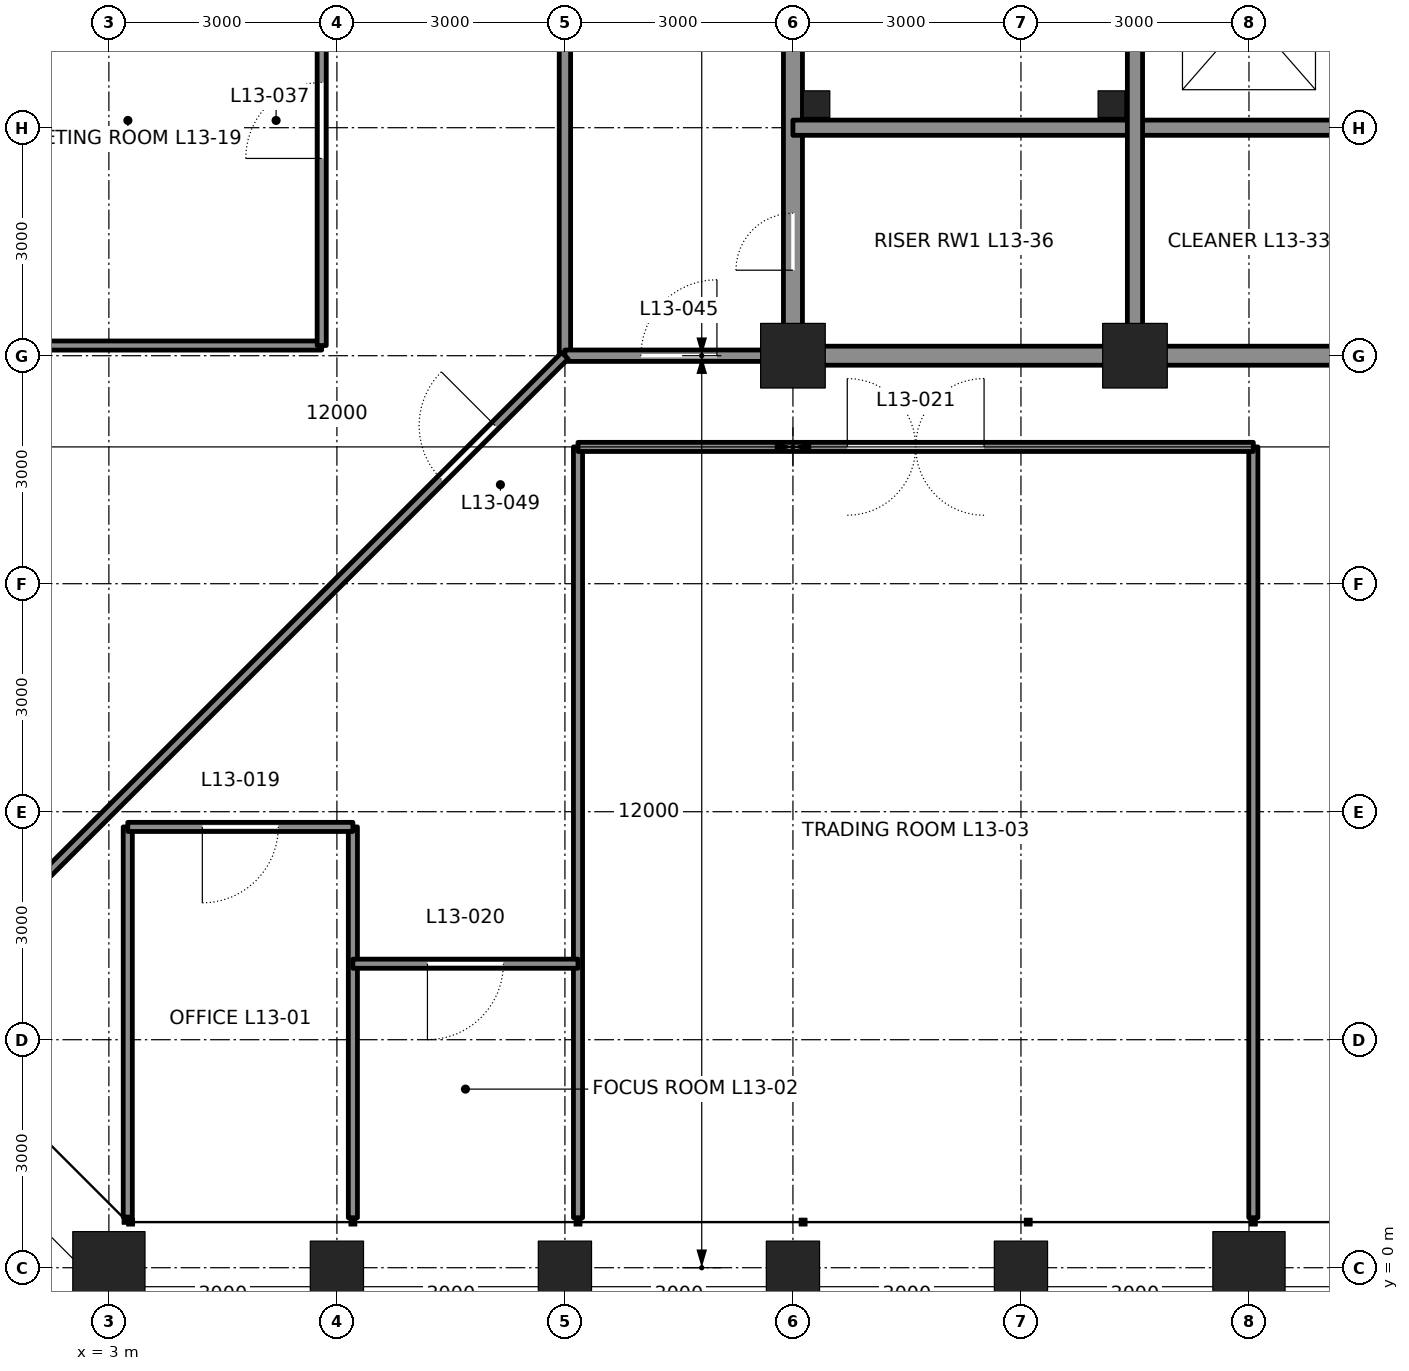
"""IFC4 building model, lengths in metres.
Left out: names, types, materials, properties, quantities, classifications, styles, units other than length and angle.
Written with IfcOpenShell. Run it as: python <this file> out.ifc"""

import sys

from ifc_helpers import new_model, si_unit, direction, frame, frame_2d, origin, origin_2d, place, context, subcontext, project, spatial, rectangle, hollow_rectangle, extrude, element, fill, save


model = new_model("IFC4")
c1 = context("Model", 3, precision=1e-05, world=origin(), true_north=direction((0.0, 1.0)))
c2 = subcontext(c1, "Body", "Model", "MODEL_VIEW")
j1 = project(units=[si_unit("LENGTHUNIT", "METRE"), si_unit("PLANEANGLEUNIT", "RADIAN")], contexts=[c1])
p1 = place(None, origin())
s1 = spatial("IfcSite", under=j1, at=p1, CompositionType="ELEMENT")
p2 = place(p1, origin())
s2 = spatial("IfcBuilding", under=s1, at=p2, CompositionType="ELEMENT")
p3 = place(p2, frame((0.0, 0.0, 64.8)))
s3 = spatial("IfcBuildingStorey", under=s2, at=p3, CompositionType="ELEMENT", Elevation=64.8)
p4 = place(p3, frame((3.0, 0.0, 0.0), z_axis=(0.0, 0.0, 1.0), x_axis=(0.0, -1.0, 0.0)))
e1 = element("IfcColumn", 1, at=p4, inside=s3, PredefinedType="COLUMN", context=c2, shape_type="SweptSolid", body=[
    extrude(hollow_rectangle(XDim=0.95, YDim=0.95, WallThickness=0.095, at=origin_2d()), origin(), (0.0, 0.0, 1.0), 4.5),
])
for number, where, z_axis, x_axis in (
    (2, (6.0, 0.0, 0.0), (0.0, 0.0, 1.0), (0.0, -1.0, 0.0)),
    (3, (9.0, 0.0, 0.0), (0.0, 0.0, 1.0), (0.0, -1.0, 0.0)),
    (4, (12.0, 0.0, 0.0), (0.0, 0.0, 1.0), (0.0, -1.0, 0.0)),
    (5, (15.0, 0.0, 0.0), (0.0, 0.0, 1.0), (0.0, -1.0, 0.0)),
):
    element("IfcColumn", number, at=place(p3, frame(where, z_axis=z_axis, x_axis=x_axis)), inside=s3, PredefinedType="COLUMN", context=c2, shape_type="SweptSolid", body=[
        extrude(hollow_rectangle(XDim=0.7, YDim=0.7, WallThickness=0.07, at=origin_2d()), origin(), (0.0, 0.0, 1.0), 4.5),
    ])
p5 = place(p3, frame((18.0, 0.0, 0.0), z_axis=(0.0, 0.0, 1.0), x_axis=(0.0, -1.0, 0.0)))
e6 = element("IfcColumn", 6, at=p5, inside=s3, PredefinedType="COLUMN", context=c2, shape_type="SweptSolid", body=[
    extrude(hollow_rectangle(XDim=0.95, YDim=0.95, WallThickness=0.11, at=origin_2d()), origin(), (0.0, 0.0, 1.0), 4.5),
])
for number, where, z_axis, x_axis in (
    (7, (12.0, 12.0, 0.0), (0.0, 0.0, 1.0), (1.0, 0.0, 0.0)),
    (8, (16.5, 12.0, 0.0), (0.0, 0.0, 1.0), (1.0, 0.0, 0.0)),
):
    element("IfcColumn", number, at=place(p3, frame(where, z_axis=z_axis, x_axis=x_axis)), inside=s3, PredefinedType="COLUMN", context=c2, shape_type="SweptSolid", body=[
        extrude(hollow_rectangle(XDim=0.85, YDim=0.85, WallThickness=0.085, at=origin_2d()), origin(), (0.0, 0.0, 1.0), 4.5),
    ])
p6 = place(p3, frame((12.0, 12.25, 0.0), z_axis=(0.0, 0.0, 1.0), x_axis=(0.0, 1.0, 0.0)))
e9 = element("IfcWall", 9, at=p6, inside=s3, PredefinedType="SOLIDWALL", context=c2, shape_type="SweptSolid", body=[
    extrude(rectangle(XDim=8.5, YDim=0.25, at=frame_2d((4.25, 0.0))), origin(), (0.0, 0.0, 1.0), 3.113),
])
p7 = place(p6, frame((0.875, 0.0, 0.0)))
e10 = element("IfcOpeningElement", 10, at=p7, cuts=e9, PredefinedType="OPENING", context=c2, shape_type="SweptSolid", body=[
    extrude(rectangle(XDim=0.75, YDim=2.1, at=frame_2d((0.375, 1.05))), frame((0.0, 0.135, 0.0), z_axis=(0.0, -1.0, 0.0), x_axis=(1.0, 0.0, 0.0)), (0.0, 0.0, 1.0), 0.27),
])
p8 = place(p3, frame((12.25, 12.0, 0.0), z_axis=(0.0, 0.0, 1.0), x_axis=(1.0, 0.0, 0.0)))
e11 = element("IfcWall", 11, at=p8, inside=s3, PredefinedType="SOLIDWALL", context=c2, shape_type="SweptSolid", body=[
    extrude(rectangle(XDim=4.0, YDim=0.25, at=frame_2d((2.0, 0.0))), origin(), (0.0, 0.0, 1.0), 3.181),
])
p9 = place(p3, frame((16.75, 12.0, 0.0), z_axis=(0.0, 0.0, 1.0), x_axis=(1.0, 0.0, 0.0)))
e12 = element("IfcWall", 12, at=p9, inside=s3, PredefinedType="SOLIDWALL", context=c2, shape_type="SweptSolid", body=[
    extrude(rectangle(XDim=2.5, YDim=0.25, at=frame_2d((1.25, 0.0))), origin(), (0.0, 0.0, 1.0), 3.181),
])
p10 = place(p3, frame((12.0, 15.0, 0.0), z_axis=(0.0, 0.0, 1.0), x_axis=(1.0, 0.0, 0.0)))
e13 = element("IfcWall", 13, at=p10, inside=s3, PredefinedType="SOLIDWALL", context=c2, shape_type="SweptSolid", body=[
    extrude(rectangle(XDim=7.5, YDim=0.2, at=frame_2d((3.75, 0.0))), origin(), (0.0, 0.0, 1.0), 4.34),
])
p11 = place(p3, frame((16.5, 12.25, 0.0), z_axis=(0.0, 0.0, 1.0), x_axis=(0.0, 1.0, 0.0)))
e14 = element("IfcWall", 14, at=p11, inside=s3, PredefinedType="SOLIDWALL", context=c2, shape_type="SweptSolid", body=[
    extrude(rectangle(XDim=8.5, YDim=0.2, at=frame_2d((4.25, 0.0))), origin(), (0.0, 0.0, 1.0), 3.413),
])
p12 = place(p3, frame((3.249, 0.666, -0.3), z_axis=(0.0, 0.0, 1.0), x_axis=(0.0, 1.0, 0.0)))
e15 = element("IfcWall", 15, at=p12, inside=s3, PredefinedType="PARTITIONING", context=c2, shape_type="SweptSolid", body=[
    extrude(rectangle(XDim=5.134, YDim=0.12, at=frame_2d((2.567, 0.0))), origin(), (0.0, 0.0, 1.0), 4.34),
])
p13 = place(p3, frame((6.21, 0.657, -0.3), z_axis=(0.0, 0.0, 1.0), x_axis=(0.0, 1.0, 0.0)))
e16 = element("IfcWall", 16, at=p13, inside=s3, PredefinedType="PARTITIONING", context=c2, shape_type="SweptSolid", body=[
    extrude(rectangle(XDim=5.143, YDim=0.12, at=frame_2d((2.571, 0.0))), origin(), (0.0, 0.0, 1.0), 4.34),
])
p14 = place(p3, frame((9.172, 0.657, -0.3), z_axis=(0.0, 0.0, 1.0), x_axis=(0.0, 1.0, 0.0)))
e17 = element("IfcWall", 17, at=p14, inside=s3, PredefinedType="PARTITIONING", context=c2, shape_type="SweptSolid", body=[
    extrude(rectangle(XDim=10.143, YDim=0.12, at=frame_2d((5.071, 0.0))), origin(), (0.0, 0.0, 1.0), 4.34),
])
p15 = place(p3, frame((18.057, 0.657, -0.3), z_axis=(0.0, 0.0, 1.0), x_axis=(0.0, 1.0, 0.0)))
e18 = element("IfcWall", 18, at=p15, inside=s3, PredefinedType="PARTITIONING", context=c2, shape_type="SweptSolid", body=[
    extrude(rectangle(XDim=10.143, YDim=0.12, at=frame_2d((5.071, 0.0))), origin(), (0.0, 0.0, 1.0), 3.646),
])
p16 = place(p3, frame((3.249, 5.8, -0.3), z_axis=(0.0, 0.0, 1.0), x_axis=(1.0, 0.0, 0.0)))
e19 = element("IfcWall", 19, at=p16, inside=s3, PredefinedType="PARTITIONING", context=c2, shape_type="SweptSolid", body=[
    extrude(rectangle(XDim=2.962, YDim=0.12, at=frame_2d((1.481, 0.0))), origin(), (0.0, 0.0, 1.0), 4.34),
])
p17 = place(p16, frame((0.981, 0.0, 0.3)))
e20 = element("IfcOpeningElement", 20, at=p17, cuts=e19, PredefinedType="OPENING", context=c2, shape_type="SweptSolid", body=[
    extrude(rectangle(XDim=1.0, YDim=2.4, at=frame_2d((0.5, 1.2))), frame((0.0, 0.07, 0.0), z_axis=(0.0, -1.0, 0.0), x_axis=(1.0, 0.0, 0.0)), (0.0, 0.0, 1.0), 0.14),
])
p18 = place(p3, frame((6.21, 4.0, -0.3), z_axis=(0.0, 0.0, 1.0), x_axis=(1.0, 0.0, 0.0)))
e21 = element("IfcWall", 21, at=p18, inside=s3, PredefinedType="PARTITIONING", context=c2, shape_type="SweptSolid", body=[
    extrude(rectangle(XDim=2.962, YDim=0.12, at=frame_2d((1.481, 0.0))), origin(), (0.0, 0.0, 1.0), 4.34),
])
p19 = place(p18, frame((0.981, 0.0, 0.3)))
e22 = element("IfcOpeningElement", 22, at=p19, cuts=e21, PredefinedType="OPENING", context=c2, shape_type="SweptSolid", body=[
    extrude(rectangle(XDim=1.0, YDim=2.4, at=frame_2d((0.5, 1.2))), frame((0.0, 0.07, 0.0), z_axis=(0.0, -1.0, 0.0), x_axis=(1.0, 0.0, 0.0)), (0.0, 0.0, 1.0), 0.14),
])
p20 = place(p3, frame((9.172, 10.8, -0.3), z_axis=(0.0, 0.0, 1.0), x_axis=(1.0, 0.0, 0.0)))
e23 = element("IfcWall", 23, at=p20, inside=s3, PredefinedType="PARTITIONING", context=c2, shape_type="SweptSolid", body=[
    extrude(rectangle(XDim=8.885, YDim=0.12, at=frame_2d((4.443, 0.0))), origin(), (0.0, 0.0, 1.0), 4.34),
])
p21 = place(p20, frame((3.543, 0.0, 0.3)))
e24 = element("IfcOpeningElement", 24, at=p21, cuts=e23, PredefinedType="OPENING", context=c2, shape_type="SweptSolid", body=[
    extrude(rectangle(XDim=1.8, YDim=2.4, at=frame_2d((0.9, 1.2))), frame((0.0, 0.07, 0.0), z_axis=(0.0, -1.0, 0.0), x_axis=(1.0, 0.0, 0.0)), (0.0, 0.0, 1.0), 0.14),
])
p22 = place(p3, frame((0.657, 12.134, -0.3), z_axis=(0.0, 0.0, 1.0), x_axis=(1.0, 0.0, 0.0)))
e25 = element("IfcWall", 25, at=p22, inside=s3, PredefinedType="PARTITIONING", context=c2, shape_type="SweptSolid", body=[
    extrude(rectangle(XDim=5.143, YDim=0.12, at=frame_2d((2.571, 0.0))), origin(), (0.0, 0.0, 1.0), 3.481),
])
p23 = place(p3, frame((5.8, 12.134, -0.3), z_axis=(0.0, 0.0, 1.0), x_axis=(0.0, 1.0, 0.0)))
e26 = element("IfcWall", 26, at=p23, inside=s3, PredefinedType="PARTITIONING", context=c2, shape_type="SweptSolid", body=[
    extrude(rectangle(XDim=5.924, YDim=0.12, at=frame_2d((2.962, 0.0))), origin(), (0.0, 0.0, 1.0), 4.34),
])
p24 = place(p23, frame((2.462, 0.0, 0.3)))
e27 = element("IfcOpeningElement", 27, at=p24, cuts=e26, PredefinedType="OPENING", context=c2, shape_type="SweptSolid", body=[
    extrude(rectangle(XDim=1.0, YDim=2.4, at=frame_2d((0.5, 1.2))), frame((0.0, 0.07, 0.0), z_axis=(0.0, -1.0, 0.0), x_axis=(1.0, 0.0, 0.0)), (0.0, 0.0, 1.0), 0.14),
])
p25 = place(p3, frame((9.0, 12.0, -0.3), z_axis=(0.0, 0.0, 1.0), x_axis=(0.0, 1.0, 0.0)))
e28 = element("IfcWall", 28, at=p25, inside=s3, PredefinedType="PARTITIONING", context=c2, shape_type="SweptSolid", body=[
    extrude(rectangle(XDim=21.0, YDim=0.15, at=frame_2d((10.5, 0.0))), origin(), (0.0, 0.0, 1.0), 4.34),
])
p26 = place(p25, frame((10.0, 0.0, 0.3)))
e29 = element("IfcOpeningElement", 29, at=p26, cuts=e28, PredefinedType="OPENING", context=c2, shape_type="SweptSolid", body=[
    extrude(rectangle(XDim=1.0, YDim=2.4, at=frame_2d((0.5, 1.2))), frame((0.0, 0.085, 0.0), z_axis=(0.0, -1.0, 0.0), x_axis=(1.0, 0.0, 0.0)), (0.0, 0.0, 1.0), 0.17),
])
p27 = place(p3, frame((9.0, 12.0, -0.3), z_axis=(0.0, 0.0, 1.0), x_axis=(1.0, 0.0, 0.0)))
e30 = element("IfcWall", 30, at=p27, inside=s3, PredefinedType="PARTITIONING", context=c2, shape_type="SweptSolid", body=[
    extrude(rectangle(XDim=3.0, YDim=0.15, at=frame_2d((1.5, 0.0))), origin(), (0.0, 0.0, 1.0), 3.481),
])
p28 = place(p27, frame((1.0, 0.0, 0.3)))
e31 = element("IfcOpeningElement", 31, at=p28, cuts=e30, PredefinedType="OPENING", context=c2, shape_type="SweptSolid", body=[
    extrude(rectangle(XDim=1.0, YDim=2.4, at=frame_2d((0.5, 1.2))), frame((0.0, 0.085, 0.0), z_axis=(0.0, -1.0, 0.0), x_axis=(1.0, 0.0, 0.0)), (0.0, 0.0, 1.0), 0.17),
])
p29 = place(p3, frame((9.0, 12.0, -0.3), z_axis=(0.0, 0.0, 1.0), x_axis=(-0.707106781187, -0.707106781187, 0.0)))
e32 = element("IfcWall", 32, at=p29, inside=s3, PredefinedType="PARTITIONING", context=c2, shape_type="SweptSolid", body=[
    extrude(rectangle(XDim=11.842, YDim=0.12, at=frame_2d((5.921, 0.0))), origin(), (0.0, 0.0, 1.0), 4.34),
])
p30 = place(p29, frame((1.3, 0.0, 0.3)))
e33 = element("IfcOpeningElement", 33, at=p30, cuts=e32, PredefinedType="OPENING", context=c2, shape_type="SweptSolid", body=[
    extrude(rectangle(XDim=1.0, YDim=2.4, at=frame_2d((0.5, 1.2))), frame((0.0, 0.07, 0.0), z_axis=(0.0, -1.0, 0.0), x_axis=(1.0, 0.0, 0.0)), (0.0, 0.0, 1.0), 0.14),
])
for number, where, z_axis, x_axis in (
    (34, (12.31, 15.31, 0.0), (0.0, 0.0, 1.0), (1.0, 0.0, 0.0)),
    (35, (16.19, 15.31, 0.0), (0.0, 0.0, 1.0), (1.0, 0.0, 0.0)),
):
    element("IfcColumn", number, at=place(p3, frame(where, z_axis=z_axis, x_axis=x_axis)), inside=s3, PredefinedType="COLUMN", context=c2, shape_type="SweptSolid", body=[
        extrude(hollow_rectangle(XDim=0.35, YDim=0.35, WallThickness=0.035, at=origin_2d()), origin(), (0.0, 0.0, 1.0), 4.5),
    ])
p31 = place(p7, origin())
e36 = element("IfcDoor", 36, at=p31, inside=s3, OperationType="SINGLE_SWING_LEFT", PredefinedType="DOOR", context=c2, shape_type="SweptSolid", body=[
    extrude(rectangle(XDim=0.75, YDim=2.1, at=frame_2d((0.375, 1.05))), frame((0.0, 0.025, 0.0), z_axis=(0.0, -1.0, 0.0), x_axis=(1.0, 0.0, 0.0)), (0.0, 0.0, 1.0), 0.05),
])
fill(e10, e36)
p32 = place(p17, frame((1.0, 0.0, 0.0), z_axis=(0.0, 0.0, 1.0), x_axis=(-1.0, 0.0, 0.0)))
e37 = element("IfcDoor", 37, at=p32, inside=s3, OperationType="SINGLE_SWING_RIGHT", PredefinedType="DOOR", context=c2, shape_type="SweptSolid", body=[
    extrude(rectangle(XDim=1.0, YDim=2.4, at=frame_2d((0.5, 1.2))), frame((0.0, 0.025, 0.0), z_axis=(0.0, -1.0, 0.0), x_axis=(1.0, 0.0, 0.0)), (0.0, 0.0, 1.0), 0.05),
])
fill(e20, e37)
p33 = place(p19, frame((1.0, 0.0, 0.0), z_axis=(0.0, 0.0, 1.0), x_axis=(-1.0, 0.0, 0.0)))
e38 = element("IfcDoor", 38, at=p33, inside=s3, OperationType="SINGLE_SWING_RIGHT", PredefinedType="DOOR", context=c2, shape_type="SweptSolid", body=[
    extrude(rectangle(XDim=1.0, YDim=2.4, at=frame_2d((0.5, 1.2))), frame((0.0, 0.025, 0.0), z_axis=(0.0, -1.0, 0.0), x_axis=(1.0, 0.0, 0.0)), (0.0, 0.0, 1.0), 0.05),
])
fill(e22, e38)
p34 = place(p21, origin())
e39 = element("IfcDoor", 39, at=p34, inside=s3, OperationType="DOUBLE_DOOR_DOUBLE_SWING", PredefinedType="DOOR", context=c2, shape_type="SweptSolid", body=[
    extrude(rectangle(XDim=1.8, YDim=2.4, at=frame_2d((0.9, 1.2))), frame((0.0, 0.025, 0.0), z_axis=(0.0, -1.0, 0.0), x_axis=(1.0, 0.0, 0.0)), (0.0, 0.0, 1.0), 0.05),
])
fill(e24, e39)
p35 = place(p24, origin())
e40 = element("IfcDoor", 40, at=p35, inside=s3, OperationType="SINGLE_SWING_LEFT", PredefinedType="DOOR", context=c2, shape_type="SweptSolid", body=[
    extrude(rectangle(XDim=1.0, YDim=2.4, at=frame_2d((0.5, 1.2))), frame((0.0, 0.025, 0.0), z_axis=(0.0, -1.0, 0.0), x_axis=(1.0, 0.0, 0.0)), (0.0, 0.0, 1.0), 0.05),
])
fill(e27, e40)
p36 = place(p28, origin())
e41 = element("IfcDoor", 41, at=p36, inside=s3, OperationType="SINGLE_SWING_RIGHT", PredefinedType="DOOR", context=c2, shape_type="SweptSolid", body=[
    extrude(rectangle(XDim=1.0, YDim=2.4, at=frame_2d((0.5, 1.2))), frame((0.0, 0.025, 0.0), z_axis=(0.0, -1.0, 0.0), x_axis=(1.0, 0.0, 0.0)), (0.0, 0.0, 1.0), 0.05),
])
fill(e31, e41)
p37 = place(p30, frame((1.0, 0.0, 0.0), z_axis=(0.0, 0.0, 1.0), x_axis=(-1.0, 0.0, 0.0)))
e42 = element("IfcDoor", 42, at=p37, inside=s3, OperationType="SINGLE_SWING_RIGHT", PredefinedType="DOOR", context=c2, shape_type="SweptSolid", body=[
    extrude(rectangle(XDim=1.0, YDim=2.4, at=frame_2d((0.5, 1.2))), frame((0.0, 0.025, 0.0), z_axis=(0.0, -1.0, 0.0), x_axis=(1.0, 0.0, 0.0)), (0.0, 0.0, 1.0), 0.05),
])
fill(e33, e42)
save(model, sys.argv[1])
